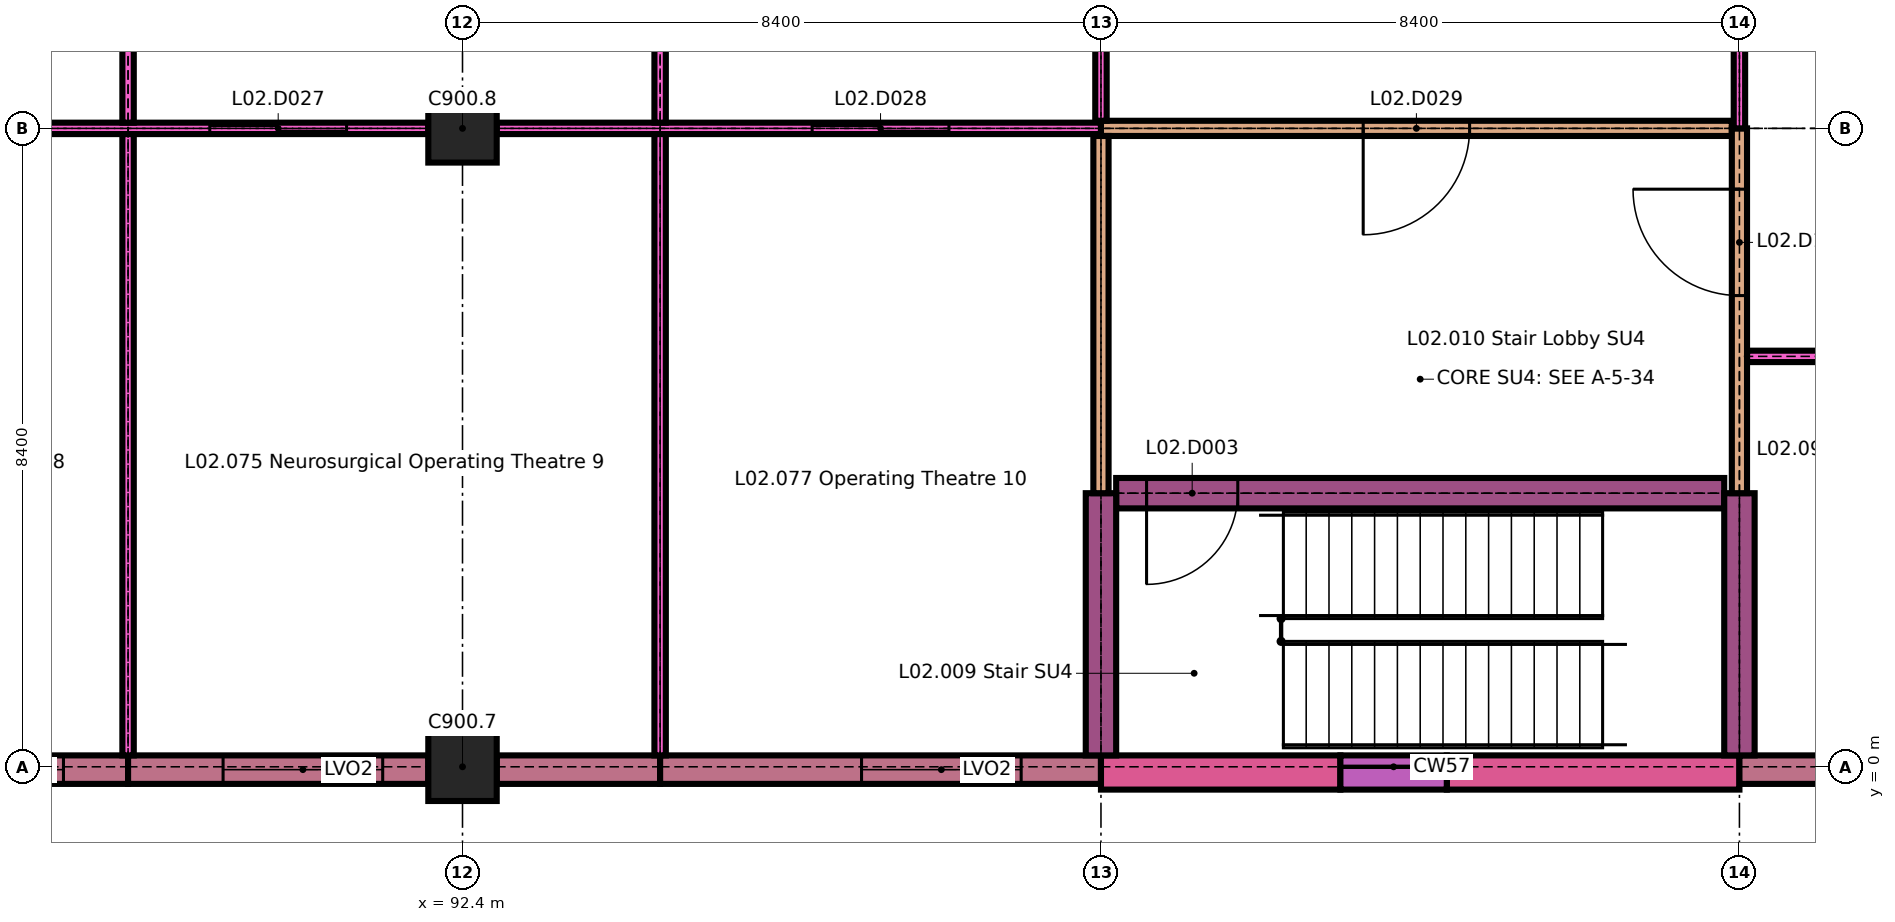
"""IFC4 building model, lengths in metres.
Left out: names, types, materials, properties, quantities, classifications, styles, units other than length and angle.
Written with IfcOpenShell. Run it as: python <this file> out.ifc"""

import sys

from ifc_helpers import new_model, si_unit, direction, frame, frame_2d, origin, origin_2d, place, context, subcontext, project, spatial, rectangle, extrude, element, fill, save


model = new_model("IFC4")
c1 = context("Model", 3, precision=1e-05, world=origin(), true_north=direction((0.0, 1.0)))
c2 = subcontext(c1, "Body", "Model", "MODEL_VIEW")
j1 = project(units=[si_unit("LENGTHUNIT", "METRE"), si_unit("PLANEANGLEUNIT", "RADIAN")], contexts=[c1])
p1 = place(None, origin())
s1 = spatial("IfcSite", under=j1, at=p1, CompositionType="ELEMENT")
p2 = place(p1, origin())
s2 = spatial("IfcBuilding", under=s1, at=p2, CompositionType="ELEMENT")
p3 = place(p2, frame((0.0, 0.0, 8.4)))
s3 = spatial("IfcBuildingStorey", under=s2, at=p3, CompositionType="ELEMENT", Elevation=8.4)
for number, where, z_axis, x_axis in (
    (1, (92.4, 0.0, 0.0), (0.0, 0.0, 1.0), (1.0, 0.0, 0.0)),
    (2, (92.4, 8.4, 0.0), (0.0, 0.0, 1.0), (1.0, 0.0, 0.0)),
):
    element("IfcColumn", number, at=place(p3, frame(where, z_axis=z_axis, x_axis=x_axis)), inside=s3, PredefinedType="COLUMN", context=c2, shape_type="SweptSolid", body=[
        extrude(rectangle(XDim=0.9, YDim=0.9, at=origin_2d()), origin(), (0.0, 0.0, 1.0), 4.2),
    ])
p4 = place(p3, frame((84.45, -0.038, 0.0), z_axis=(0.0, 0.0, 1.0), x_axis=(1.0, 0.0, 0.0)))
e3 = element("IfcWall", 3, at=p4, inside=s3, PredefinedType="SOLIDWALL", context=c2, shape_type="SweptSolid", body=[
    extrude(rectangle(XDim=3.55, YDim=0.375, at=frame_2d((1.775, 0.0))), origin(), (0.0, 0.0, 1.0), 3.9),
])
p5 = place(p4, frame((0.6, 0.0, 0.9)))
e4 = element("IfcOpeningElement", 4, at=p5, cuts=e3, PredefinedType="OPENING", context=c2, shape_type="SweptSolid", body=[
    extrude(rectangle(XDim=2.1, YDim=2.4, at=frame_2d((1.05, 1.2))), frame((0.0, 0.198, 0.0), z_axis=(0.0, -1.0, 0.0), x_axis=(1.0, 0.0, 0.0)), (0.0, 0.0, 1.0), 0.395),
])
p6 = place(p3, frame((88.0, -0.038, 0.0), z_axis=(0.0, 0.0, 1.0), x_axis=(1.0, 0.0, 0.0)))
e5 = element("IfcWall", 5, at=p6, inside=s3, PredefinedType="SOLIDWALL", context=c2, shape_type="SweptSolid", body=[
    extrude(rectangle(XDim=3.95, YDim=0.375, at=frame_2d((1.975, 0.0))), origin(), (0.0, 0.0, 1.0), 3.9),
])
p7 = place(p6, frame((1.25, 0.0, 0.9)))
e6 = element("IfcOpeningElement", 6, at=p7, cuts=e5, PredefinedType="OPENING", context=c2, shape_type="SweptSolid", body=[
    extrude(rectangle(XDim=2.1, YDim=2.4, at=frame_2d((1.05, 1.2))), frame((0.0, 0.198, 0.0), z_axis=(0.0, -1.0, 0.0), x_axis=(1.0, 0.0, 0.0)), (0.0, 0.0, 1.0), 0.395),
])
p8 = place(p3, frame((92.85, -0.038, 0.0), z_axis=(0.0, 0.0, 1.0), x_axis=(1.0, 0.0, 0.0)))
e7 = element("IfcWall", 7, at=p8, inside=s3, PredefinedType="SOLIDWALL", context=c2, shape_type="SweptSolid", body=[
    extrude(rectangle(XDim=2.15, YDim=0.375, at=frame_2d((1.075, 0.0))), origin(), (0.0, 0.0, 1.0), 3.9),
])
p9 = place(p3, frame((95.0, -0.038, 0.0), z_axis=(0.0, 0.0, 1.0), x_axis=(1.0, 0.0, 0.0)))
e8 = element("IfcWall", 8, at=p9, inside=s3, PredefinedType="SOLIDWALL", context=c2, shape_type="SweptSolid", body=[
    extrude(rectangle(XDim=5.8, YDim=0.375, at=frame_2d((2.9, 0.0))), origin(), (0.0, 0.0, 1.0), 3.9),
])
p10 = place(p9, frame((2.65, 0.0, 0.9)))
e9 = element("IfcOpeningElement", 9, at=p10, cuts=e8, PredefinedType="OPENING", context=c2, shape_type="SweptSolid", body=[
    extrude(rectangle(XDim=2.1, YDim=2.4, at=frame_2d((1.05, 1.2))), frame((0.0, 0.198, 0.0), z_axis=(0.0, -1.0, 0.0), x_axis=(1.0, 0.0, 0.0)), (0.0, 0.0, 1.0), 0.395),
])
p11 = place(p3, frame((100.8, -0.075, 0.0), z_axis=(0.0, 0.0, 1.0), x_axis=(1.0, 0.0, 0.0)))
e10 = element("IfcWall", 10, at=p11, inside=s3, PredefinedType="SOLIDWALL", context=c2, shape_type="SweptSolid", body=[
    extrude(rectangle(XDim=3.15, YDim=0.45, at=frame_2d((1.575, 0.0))), origin(), (0.0, 0.0, 1.0), 4.2),
])
p12 = place(p3, frame((105.35, -0.075, 0.0), z_axis=(0.0, 0.0, 1.0), x_axis=(1.0, 0.0, 0.0)))
e11 = element("IfcWall", 11, at=p12, inside=s3, PredefinedType="SOLIDWALL", context=c2, shape_type="SweptSolid", body=[
    extrude(rectangle(XDim=3.85, YDim=0.45, at=frame_2d((1.925, 0.0))), origin(), (0.0, 0.0, 1.0), 4.2),
])
p13 = place(p3, frame((103.95, -0.075, 0.0), z_axis=(0.0, 0.0, 1.0), x_axis=(1.0, 0.0, 0.0)))
e12 = element("IfcWall", 12, at=p13, inside=s3, PredefinedType="SOLIDWALL", context=c2, shape_type="SweptSolid", body=[
    extrude(rectangle(XDim=1.4, YDim=0.45, at=frame_2d((0.7, 0.0))), origin(), (0.0, 0.0, 1.0), 0.6),
])
p14 = place(p3, frame((109.2, -0.038, 0.0), z_axis=(0.0, 0.0, 1.0), x_axis=(1.0, 0.0, 0.0)))
e13 = element("IfcWall", 13, at=p14, inside=s3, PredefinedType="SOLIDWALL", context=c2, shape_type="SweptSolid", body=[
    extrude(rectangle(XDim=5.0, YDim=0.375, at=frame_2d((2.5, 0.0))), origin(), (0.0, 0.0, 1.0), 3.9),
])
p15 = place(p14, frame((1.05, 0.0, 0.9)))
e14 = element("IfcOpeningElement", 14, at=p15, cuts=e13, PredefinedType="OPENING", context=c2, shape_type="SweptSolid", body=[
    extrude(rectangle(XDim=2.1, YDim=2.1, at=frame_2d((1.05, 1.05))), frame((0.0, 0.198, 0.0), z_axis=(0.0, -1.0, 0.0), x_axis=(1.0, 0.0, 0.0)), (0.0, 0.0, 1.0), 0.395),
])
p16 = place(p3, frame((101.0, 3.6, 0.0), z_axis=(0.0, 0.0, 1.0), x_axis=(1.0, 0.0, 0.0)))
e15 = element("IfcWall", 15, at=p16, inside=s3, PredefinedType="SHEAR", context=c2, shape_type="SweptSolid", body=[
    extrude(rectangle(XDim=8.0, YDim=0.4, at=frame_2d((4.0, 0.0))), origin(), (0.0, 0.0, 1.0), 4.2),
])
p17 = place(p16, frame((0.4, 0.0, 0.0)))
e16 = element("IfcOpeningElement", 16, at=p17, cuts=e15, PredefinedType="OPENING", context=c2, shape_type="SweptSolid", body=[
    extrude(rectangle(XDim=1.2, YDim=2.1, at=frame_2d((0.6, 1.05))), frame((0.0, 0.21, 0.0), z_axis=(0.0, -1.0, 0.0), x_axis=(1.0, 0.0, 0.0)), (0.0, 0.0, 1.0), 0.42),
])
p18 = place(p3, frame((109.3, 5.4, 0.0), z_axis=(0.0, 0.0, 1.0), x_axis=(1.0, 0.0, 0.0)))
e17 = element("IfcWall", 17, at=p18, inside=s3, PredefinedType="PARTITIONING", context=c2, shape_type="SweptSolid", body=[
    extrude(rectangle(XDim=25.0, YDim=0.15, at=frame_2d((12.5, 0.0))), origin(), (0.0, 0.0, 1.0), 4.2),
])
p19 = place(p18, frame((1.55, 0.0, 0.0)))
e18 = element("IfcOpeningElement", 18, at=p19, cuts=e17, PredefinedType="OPENING", context=c2, shape_type="SweptSolid", body=[
    extrude(rectangle(XDim=1.8, YDim=2.4, at=frame_2d((0.9, 1.2))), frame((0.0, 0.085, 0.0), z_axis=(0.0, -1.0, 0.0), x_axis=(1.0, 0.0, 0.0)), (0.0, 0.0, 1.0), 0.17),
])
p20 = place(p18, frame((6.5, 0.0, 0.0)))
e19 = element("IfcOpeningElement", 19, at=p20, cuts=e17, PredefinedType="OPENING", context=c2, shape_type="SweptSolid", body=[
    extrude(rectangle(XDim=1.8, YDim=2.4, at=frame_2d((0.9, 1.2))), frame((0.0, 0.085, 0.0), z_axis=(0.0, -1.0, 0.0), x_axis=(1.0, 0.0, 0.0)), (0.0, 0.0, 1.0), 0.17),
])
p21 = place(p18, frame((11.5, 0.0, 0.0)))
e20 = element("IfcOpeningElement", 20, at=p21, cuts=e17, PredefinedType="OPENING", context=c2, shape_type="SweptSolid", body=[
    extrude(rectangle(XDim=1.8, YDim=2.4, at=frame_2d((0.9, 1.2))), frame((0.0, 0.085, 0.0), z_axis=(0.0, -1.0, 0.0), x_axis=(1.0, 0.0, 0.0)), (0.0, 0.0, 1.0), 0.17),
])
p22 = place(p18, frame((16.5, 0.0, 0.0)))
e21 = element("IfcOpeningElement", 21, at=p22, cuts=e17, PredefinedType="OPENING", context=c2, shape_type="SweptSolid", body=[
    extrude(rectangle(XDim=1.8, YDim=2.4, at=frame_2d((0.9, 1.2))), frame((0.0, 0.085, 0.0), z_axis=(0.0, -1.0, 0.0), x_axis=(1.0, 0.0, 0.0)), (0.0, 0.0, 1.0), 0.17),
])
p23 = place(p18, frame((21.55, 0.0, 0.0)))
e22 = element("IfcOpeningElement", 22, at=p23, cuts=e17, PredefinedType="OPENING", context=c2, shape_type="SweptSolid", body=[
    extrude(rectangle(XDim=1.8, YDim=2.4, at=frame_2d((0.9, 1.2))), frame((0.0, 0.085, 0.0), z_axis=(0.0, -1.0, 0.0), x_axis=(1.0, 0.0, 0.0)), (0.0, 0.0, 1.0), 0.17),
])
p24 = place(p3, frame((84.45, 8.4, 0.0), z_axis=(0.0, 0.0, 1.0), x_axis=(1.0, 0.0, 0.0)))
e23 = element("IfcWall", 23, at=p24, inside=s3, PredefinedType="PARTITIONING", context=c2, shape_type="SweptSolid", body=[
    extrude(rectangle(XDim=7.5, YDim=0.15, at=frame_2d((3.75, 0.0))), origin(), (0.0, 0.0, 1.0), 4.2),
])
p25 = place(p24, frame((4.625, 0.0, 0.0)))
e24 = element("IfcOpeningElement", 24, at=p25, cuts=e23, PredefinedType="OPENING", context=c2, shape_type="SweptSolid", body=[
    extrude(rectangle(XDim=1.8, YDim=2.4, at=frame_2d((0.9, 1.2))), frame((0.0, 0.085, 0.0), z_axis=(0.0, -1.0, 0.0), x_axis=(1.0, 0.0, 0.0)), (0.0, 0.0, 1.0), 0.17),
])
p26 = place(p3, frame((92.85, 8.4, 0.0), z_axis=(0.0, 0.0, 1.0), x_axis=(1.0, 0.0, 0.0)))
e25 = element("IfcWall", 25, at=p26, inside=s3, PredefinedType="PARTITIONING", context=c2, shape_type="SweptSolid", body=[
    extrude(rectangle(XDim=7.95, YDim=0.15, at=frame_2d((3.975, 0.0))), origin(), (0.0, 0.0, 1.0), 4.2),
])
p27 = place(p26, frame((4.15, 0.0, 0.0)))
e26 = element("IfcOpeningElement", 26, at=p27, cuts=e25, PredefinedType="OPENING", context=c2, shape_type="SweptSolid", body=[
    extrude(rectangle(XDim=1.8, YDim=2.4, at=frame_2d((0.9, 1.2))), frame((0.0, 0.085, 0.0), z_axis=(0.0, -1.0, 0.0), x_axis=(1.0, 0.0, 0.0)), (0.0, 0.0, 1.0), 0.17),
])
p28 = place(p3, frame((100.8, 8.4, 0.0), z_axis=(0.0, 0.0, 1.0), x_axis=(1.0, 0.0, 0.0)))
e27 = element("IfcWall", 27, at=p28, inside=s3, PredefinedType="PARTITIONING", context=c2, shape_type="SweptSolid", body=[
    extrude(rectangle(XDim=8.3, YDim=0.2, at=frame_2d((4.15, 0.0))), origin(), (0.0, 0.0, 1.0), 4.2),
])
p29 = place(p28, frame((3.45, 0.0, 0.0)))
e28 = element("IfcOpeningElement", 28, at=p29, cuts=e27, PredefinedType="OPENING", context=c2, shape_type="SweptSolid", body=[
    extrude(rectangle(XDim=1.4, YDim=2.1, at=frame_2d((0.7, 1.05))), frame((0.0, 0.11, 0.0), z_axis=(0.0, -1.0, 0.0), x_axis=(1.0, 0.0, 0.0)), (0.0, 0.0, 1.0), 0.22),
])
p30 = place(p3, frame((88.0, 0.15, 0.0), z_axis=(0.0, 0.0, 1.0), x_axis=(0.0, 1.0, 0.0)))
e29 = element("IfcWall", 29, at=p30, inside=s3, PredefinedType="PARTITIONING", context=c2, shape_type="SweptSolid", body=[
    extrude(rectangle(XDim=8.175, YDim=0.15, at=frame_2d((4.087, 0.0))), origin(), (0.0, 0.0, 1.0), 4.2),
])
p31 = place(p3, frame((88.0, 8.475, 0.0), z_axis=(0.0, 0.0, 1.0), x_axis=(0.0, 1.0, 0.0)))
e30 = element("IfcWall", 30, at=p31, inside=s3, PredefinedType="PARTITIONING", context=c2, shape_type="SweptSolid", body=[
    extrude(rectangle(XDim=5.25, YDim=0.15, at=frame_2d((2.625, 0.0))), origin(), (0.0, 0.0, 1.0), 4.2),
])
p32 = place(p3, frame((95.0, 0.15, 0.0), z_axis=(0.0, 0.0, 1.0), x_axis=(0.0, 1.0, 0.0)))
e31 = element("IfcWall", 31, at=p32, inside=s3, PredefinedType="PARTITIONING", context=c2, shape_type="SweptSolid", body=[
    extrude(rectangle(XDim=8.175, YDim=0.15, at=frame_2d((4.087, 0.0))), origin(), (0.0, 0.0, 1.0), 4.2),
])
p33 = place(p3, frame((95.0, 8.475, 0.0), z_axis=(0.0, 0.0, 1.0), x_axis=(0.0, 1.0, 0.0)))
e32 = element("IfcWall", 32, at=p33, inside=s3, PredefinedType="PARTITIONING", context=c2, shape_type="SweptSolid", body=[
    extrude(rectangle(XDim=5.25, YDim=0.15, at=frame_2d((2.625, 0.0))), origin(), (0.0, 0.0, 1.0), 4.2),
])
p34 = place(p3, frame((100.8, 0.15, 0.0), z_axis=(0.0, 0.0, 1.0), x_axis=(0.0, 1.0, 0.0)))
e33 = element("IfcWall", 33, at=p34, inside=s3, PredefinedType="SHEAR", context=c2, shape_type="SweptSolid", body=[
    extrude(rectangle(XDim=3.45, YDim=0.4, at=frame_2d((1.725, 0.0))), origin(), (0.0, 0.0, 1.0), 4.2),
])
p35 = place(p3, frame((100.8, 3.6, 0.0), z_axis=(0.0, 0.0, 1.0), x_axis=(0.0, 1.0, 0.0)))
e34 = element("IfcWall", 34, at=p35, inside=s3, PredefinedType="PARTITIONING", context=c2, shape_type="SweptSolid", body=[
    extrude(rectangle(XDim=4.7, YDim=0.2, at=frame_2d((2.35, 0.0))), origin(), (0.0, 0.0, 1.0), 4.2),
])
p36 = place(p3, frame((100.8, 8.5, 0.0), z_axis=(0.0, 0.0, 1.0), x_axis=(0.0, 1.0, 0.0)))
e35 = element("IfcWall", 35, at=p36, inside=s3, PredefinedType="PARTITIONING", context=c2, shape_type="SweptSolid", body=[
    extrude(rectangle(XDim=5.225, YDim=0.15, at=frame_2d((2.613, 0.0))), origin(), (0.0, 0.0, 1.0), 4.2),
])
p37 = place(p3, frame((109.2, 0.15, 0.0), z_axis=(0.0, 0.0, 1.0), x_axis=(0.0, 1.0, 0.0)))
e36 = element("IfcWall", 36, at=p37, inside=s3, PredefinedType="SHEAR", context=c2, shape_type="SweptSolid", body=[
    extrude(rectangle(XDim=3.45, YDim=0.4, at=frame_2d((1.725, 0.0))), origin(), (0.0, 0.0, 1.0), 4.2),
])
p38 = place(p3, frame((109.2, 3.6, 0.0), z_axis=(0.0, 0.0, 1.0), x_axis=(0.0, 1.0, 0.0)))
e37 = element("IfcWall", 37, at=p38, inside=s3, PredefinedType="PARTITIONING", context=c2, shape_type="SweptSolid", body=[
    extrude(rectangle(XDim=4.8, YDim=0.2, at=frame_2d((2.4, 0.0))), origin(), (0.0, 0.0, 1.0), 4.2),
])
p39 = place(p38, frame((2.6, 0.0, 0.0)))
e38 = element("IfcOpeningElement", 38, at=p39, cuts=e37, PredefinedType="OPENING", context=c2, shape_type="SweptSolid", body=[
    extrude(rectangle(XDim=1.4, YDim=2.1, at=frame_2d((0.7, 1.05))), frame((0.0, 0.11, 0.0), z_axis=(0.0, -1.0, 0.0), x_axis=(1.0, 0.0, 0.0)), (0.0, 0.0, 1.0), 0.22),
])
p40 = place(p3, frame((109.2, 8.4, 0.0), z_axis=(0.0, 0.0, 1.0), x_axis=(0.0, 1.0, 0.0)))
e39 = element("IfcWall", 39, at=p40, inside=s3, PredefinedType="PARTITIONING", context=c2, shape_type="SweptSolid", body=[
    extrude(rectangle(XDim=5.4, YDim=0.15, at=frame_2d((2.7, 0.0))), origin(), (0.0, 0.0, 1.0), 4.2),
])
p41 = place(p5, origin())
e40 = element("IfcWindow", 40, at=p41, inside=s3, PartitioningType="SINGLE_PANEL", PredefinedType="WINDOW", context=c2, shape_type="SweptSolid", body=[
    extrude(rectangle(XDim=2.1, YDim=2.4, at=frame_2d((1.05, 1.2))), frame((0.0, 0.075, 0.0), z_axis=(0.0, -1.0, 0.0), x_axis=(1.0, 0.0, 0.0)), (0.0, 0.0, 1.0), 0.15),
])
fill(e4, e40)
p42 = place(p7, origin())
e41 = element("IfcWindow", 41, at=p42, inside=s3, PartitioningType="SINGLE_PANEL", PredefinedType="WINDOW", context=c2, shape_type="SweptSolid", body=[
    extrude(rectangle(XDim=2.1, YDim=2.4, at=frame_2d((1.05, 1.2))), frame((0.0, 0.075, 0.0), z_axis=(0.0, -1.0, 0.0), x_axis=(1.0, 0.0, 0.0)), (0.0, 0.0, 1.0), 0.15),
])
fill(e6, e41)
p43 = place(p10, origin())
e42 = element("IfcWindow", 42, at=p43, inside=s3, PartitioningType="SINGLE_PANEL", PredefinedType="WINDOW", context=c2, shape_type="SweptSolid", body=[
    extrude(rectangle(XDim=2.1, YDim=2.4, at=frame_2d((1.05, 1.2))), frame((0.0, 0.075, 0.0), z_axis=(0.0, -1.0, 0.0), x_axis=(1.0, 0.0, 0.0)), (0.0, 0.0, 1.0), 0.15),
])
fill(e9, e42)
p44 = place(p17, origin())
e43 = element("IfcDoor", 43, at=p44, inside=s3, OperationType="SINGLE_SWING_LEFT", PredefinedType="DOOR", context=c2, shape_type="SweptSolid", body=[
    extrude(rectangle(XDim=1.2, YDim=2.1, at=frame_2d((0.6, 1.05))), frame((0.0, 0.025, 0.0), z_axis=(0.0, -1.0, 0.0), x_axis=(1.0, 0.0, 0.0)), (0.0, 0.0, 1.0), 0.05),
])
fill(e16, e43)
p45 = place(p25, origin())
e44 = element("IfcDoor", 44, at=p45, inside=s3, OperationType="DOUBLE_DOOR_SLIDING", PredefinedType="DOOR", context=c2, shape_type="SweptSolid", body=[
    extrude(rectangle(XDim=1.8, YDim=2.4, at=frame_2d((0.9, 1.2))), frame((0.0, 0.045, 0.0), z_axis=(0.0, -1.0, 0.0), x_axis=(1.0, 0.0, 0.0)), (0.0, 0.0, 1.0), 0.09),
])
fill(e24, e44)
p46 = place(p27, origin())
e45 = element("IfcDoor", 45, at=p46, inside=s3, OperationType="DOUBLE_DOOR_SLIDING", PredefinedType="DOOR", context=c2, shape_type="SweptSolid", body=[
    extrude(rectangle(XDim=1.8, YDim=2.4, at=frame_2d((0.9, 1.2))), frame((0.0, 0.045, 0.0), z_axis=(0.0, -1.0, 0.0), x_axis=(1.0, 0.0, 0.0)), (0.0, 0.0, 1.0), 0.09),
])
fill(e26, e45)
p47 = place(p29, origin())
e46 = element("IfcDoor", 46, at=p47, inside=s3, OperationType="SINGLE_SWING_LEFT", PredefinedType="DOOR", context=c2, shape_type="SweptSolid", body=[
    extrude(rectangle(XDim=1.4, YDim=2.1, at=frame_2d((0.7, 1.05))), frame((0.0, 0.025, 0.0), z_axis=(0.0, -1.0, 0.0), x_axis=(1.0, 0.0, 0.0)), (0.0, 0.0, 1.0), 0.05),
])
fill(e28, e46)
p48 = place(p39, origin())
e47 = element("IfcDoor", 47, at=p48, inside=s3, OperationType="SINGLE_SWING_LEFT", PredefinedType="DOOR", context=c2, shape_type="SweptSolid", body=[
    extrude(rectangle(XDim=1.4, YDim=2.1, at=frame_2d((0.7, 1.05))), frame((0.0, 0.03, 0.0), z_axis=(0.0, -1.0, 0.0), x_axis=(1.0, 0.0, 0.0)), (0.0, 0.0, 1.0), 0.06),
])
fill(e38, e47)
save(model, sys.argv[1])
